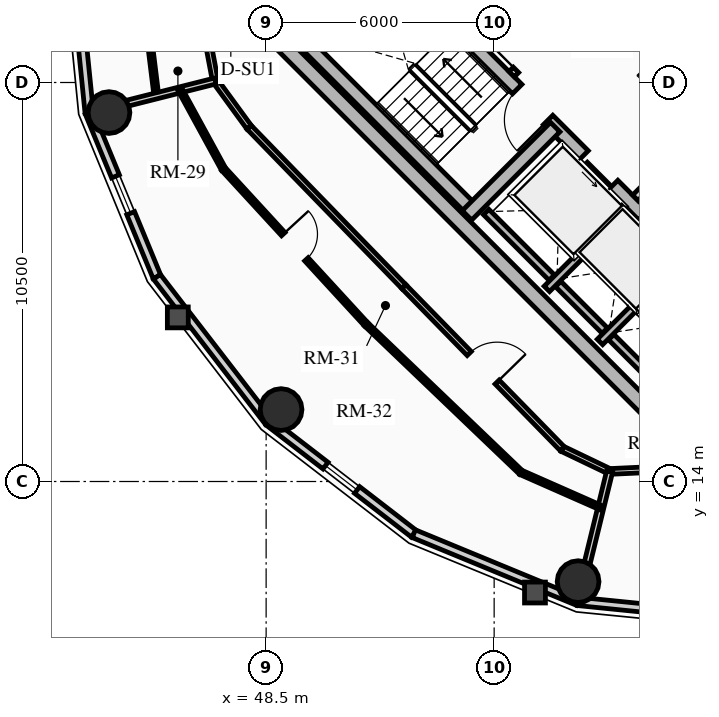
"""IFC4 building model, lengths in metres.
Left out: names, types, materials, properties, quantities, classifications, styles, units other than length and angle.
Written with IfcOpenShell. Run it as: python <this file> out.ifc"""

import sys

from ifc_helpers import new_model, si_unit, direction, frame, frame_2d, origin, origin_2d, place, context, subcontext, project, spatial, rectangle, circle, extrude, source, transform, mapped, element, fill, save


model = new_model("IFC4")
c1 = context("Model", 3, precision=1e-05, world=origin(), true_north=direction((0.0, 1.0)))
c2 = subcontext(c1, "Body", "Model", "MODEL_VIEW")
j1 = project(units=[si_unit("LENGTHUNIT", "METRE"), si_unit("PLANEANGLEUNIT", "RADIAN")], contexts=[c1])
p1 = place(None, origin())
s1 = spatial("IfcSite", under=j1, at=p1, CompositionType="ELEMENT")
p2 = place(p1, origin())
s2 = spatial("IfcBuilding", under=s1, at=p2, CompositionType="ELEMENT")
p3 = place(p2, frame((0.0, 0.0, 217.03)))
s3 = spatial("IfcBuildingStorey", under=s2, at=p3, CompositionType="ELEMENT", Elevation=217.03)
for number, where, z_axis, x_axis in (
    (1, (58.702, 15.732, 0.0), (0.0, 0.0, 1.0), (-0.707, 0.707, 0.0)),
    (2, (66.268, 23.298, 0.0), (0.0, 0.0, 1.0), (-0.707, 0.707, 0.0)),
):
    element("IfcWall", number, at=place(p3, frame(where, z_axis=z_axis, x_axis=x_axis)), inside=s3, PredefinedType="SHEAR", context=c2, shape_type="SweptSolid", body=[
        extrude(rectangle(XDim=14.1, YDim=0.4, at=frame_2d((7.05, 0.0))), origin(), (0.0, 0.0, 1.0), 2.91),
    ])
p4 = place(p3, frame((61.06, 18.373, 0.0), z_axis=(0.0, 0.0, 1.0), x_axis=(-0.707106781187, 0.707106781187, 0.0)))
e3 = element("IfcWall", 3, at=p4, inside=s3, PredefinedType="SHEAR", context=c2, shape_type="SweptSolid", body=[
    extrude(rectangle(XDim=13.7, YDim=0.35, at=frame_2d((6.85, 0.0))), origin(), (0.0, 0.0, 1.0), 2.91),
])
m1 = source(origin(), c2, "Body", "SweptSolid", [
    extrude(rectangle(XDim=1.1, YDim=2.015, at=frame_2d((0.55, 1.007))), frame((0.0, 0.185, 0.0), z_axis=(0.0, -1.0, 0.0), x_axis=(1.0, 0.0, 0.0)), (0.0, 0.0, 1.0), 0.37),
])
p5 = place(p4, frame((4.85, 0.0, 0.0)))
e4 = element("IfcOpeningElement", 4, at=p5, cuts=e3, PredefinedType="OPENING", context=c2, shape_type="MappedRepresentation", body=[
    mapped(m1, transform((0.0, 0.0, 0.0), x_axis=(1.0, 0.0, 0.0), y_axis=(0.0, 1.0, 0.0), z_axis=(0.0, 0.0, 1.0), scale=1.0)),
])
p6 = place(p4, frame((0.625, 0.0, 0.0)))
e5 = element("IfcOpeningElement", 5, at=p6, cuts=e3, PredefinedType="OPENING", context=c2, shape_type="MappedRepresentation", body=[
    mapped(m1, transform((0.0, 0.0, 0.0), x_axis=(1.0, 0.0, 0.0), y_axis=(0.0, 1.0, 0.0), z_axis=(0.0, 0.0, 1.0), scale=1.0)),
])
p7 = place(p4, frame((2.625, 0.0, 0.0)))
e6 = element("IfcOpeningElement", 6, at=p7, cuts=e3, PredefinedType="OPENING", context=c2, shape_type="MappedRepresentation", body=[
    mapped(m1, transform((0.0, 0.0, 0.0), x_axis=(1.0, 0.0, 0.0), y_axis=(0.0, 1.0, 0.0), z_axis=(0.0, 0.0, 1.0), scale=1.0)),
])
m2 = source(origin(), c2, "Body", "SweptSolid", [
    extrude(rectangle(XDim=1.15, YDim=2.02, at=frame_2d((0.575, 1.01))), frame((0.0, 0.185, 0.0), z_axis=(0.0, -1.0, 0.0), x_axis=(1.0, 0.0, 0.0)), (0.0, 0.0, 1.0), 0.37),
])
p8 = place(p4, frame((7.27, 0.0, 0.0)))
e7 = element("IfcOpeningElement", 7, at=p8, cuts=e3, PredefinedType="OPENING", context=c2, shape_type="MappedRepresentation", body=[
    mapped(m2, transform((0.0, 0.0, 0.0), x_axis=(1.0, 0.0, 0.0), y_axis=(0.0, 1.0, 0.0), z_axis=(0.0, 0.0, 1.0), scale=1.0)),
])
p9 = place(p3, frame((63.627, 20.94, 0.0), z_axis=(0.0, 0.0, 1.0), x_axis=(-0.707119496762, 0.707094065383, 0.0)))
e8 = element("IfcWall", 8, at=p9, inside=s3, PredefinedType="SHEAR", context=c2, shape_type="SweptSolid", body=[
    extrude(rectangle(XDim=9.6, YDim=0.35, at=frame_2d((4.8, 0.0))), origin(), (0.0, 0.0, 1.0), 2.91),
])
p10 = place(p9, frame((5.28, 0.0, 0.0)))
e9 = element("IfcOpeningElement", 9, at=p10, cuts=e8, PredefinedType="OPENING", context=c2, shape_type="MappedRepresentation", body=[
    mapped(m2, transform((0.0, 0.0, 0.0), x_axis=(1.0, 0.0, 0.0), y_axis=(0.0, 1.0, 0.0), z_axis=(0.0, 0.0, 1.0), scale=1.0)),
])
p11 = place(p3, frame((53.922, 21.141, 0.0), z_axis=(0.0, 0.0, 1.0), x_axis=(-0.707106781187, 0.707106781187, 0.0)))
e10 = element("IfcWall", 10, at=p11, inside=s3, PredefinedType="SHEAR", context=c2, shape_type="SweptSolid", body=[
    extrude(rectangle(XDim=6.695, YDim=0.35, at=frame_2d((3.348, 0.0))), origin(), (0.0, 0.0, 1.0), 2.91),
])
p12 = place(p3, frame((53.784, 21.003, 0.0), z_axis=(0.0, 0.0, 1.0), x_axis=(0.707106781187, 0.707106781187, 0.0)))
e11 = element("IfcWall", 11, at=p12, inside=s3, PredefinedType="SHEAR", context=c2, shape_type="SweptSolid", body=[
    extrude(rectangle(XDim=3.285, YDim=0.35, at=frame_2d((1.643, 0.0))), origin(), (0.0, 0.0, 1.0), 2.91),
])
for number, where, z_axis, x_axis in (
    (12, (44.365, 23.709, 0.0), (0.0, 0.0, 1.0), (1.0, 0.0, 0.0)),
    (13, (48.893, 15.893, 0.0), (0.0, 0.0, 1.0), (1.0, 0.0, 0.0)),
    (14, (56.709, 11.365, 0.0), (0.0, 0.0, 1.0), (1.0, 0.0, 0.0)),
):
    element("IfcColumn", number, at=place(p3, frame(where, z_axis=z_axis, x_axis=x_axis)), inside=s3, PredefinedType="USERDEFINED", context=c2, shape_type="SweptSolid", body=[
        extrude(circle(Radius=0.55, at=origin_2d()), origin(), (0.0, 0.0, 1.0), 2.91),
    ])
p13 = place(p3, frame((43.845, 23.705, 0.0), z_axis=(0.0, 0.0, 1.0), x_axis=(-0.100570534541, 0.994929930991, 0.0)))
e15 = element("IfcWall", 15, at=p13, inside=s3, PredefinedType="SOLIDWALL", context=c2, shape_type="SweptSolid", body=[
    extrude(rectangle(XDim=4.418, YDim=0.22, at=frame_2d((2.209, 0.0))), origin(), (0.0, 0.0, 1.0), 2.322),
])
m3 = source(origin(), c2, "Body", "SweptSolid", [
    extrude(rectangle(XDim=1.05, YDim=1.3, at=frame_2d((0.525, 0.65))), frame((0.0, 0.12, 0.0), z_axis=(0.0, -1.0, 0.0), x_axis=(1.0, 0.0, 0.0)), (0.0, 0.0, 1.0), 0.24),
])
p14 = place(p13, frame((1.684, 0.0, 0.65)))
e16 = element("IfcOpeningElement", 16, at=p14, cuts=e15, PredefinedType="OPENING", context=c2, shape_type="MappedRepresentation", body=[
    mapped(m3, transform((0.0, 0.0, 0.0), x_axis=(1.0, 0.0, 0.0), y_axis=(0.0, 1.0, 0.0), z_axis=(0.0, 0.0, 1.0), scale=1.0)),
])
p15 = place(p3, frame((45.626, 19.387, 0.0), z_axis=(0.0, 0.0, 1.0), x_axis=(-0.381309704956, 0.924447353237, 0.0)))
e17 = element("IfcWall", 17, at=p15, inside=s3, PredefinedType="SOLIDWALL", context=c2, shape_type="SweptSolid", body=[
    extrude(rectangle(XDim=4.671, YDim=0.22, at=frame_2d((2.335, 0.0))), origin(), (0.0, 0.0, 1.0), 2.322),
])
p16 = place(p15, frame((1.81, 0.0, 0.65)))
e18 = element("IfcOpeningElement", 18, at=p16, cuts=e17, PredefinedType="OPENING", context=c2, shape_type="MappedRepresentation", body=[
    mapped(m3, transform((0.0, 0.0, 0.0), x_axis=(1.0, 0.0, 0.0), y_axis=(0.0, 1.0, 0.0), z_axis=(0.0, 0.0, 1.0), scale=1.0)),
])
p17 = place(p3, frame((48.569, 15.569, 0.0), z_axis=(0.0, 0.0, 1.0), x_axis=(-0.610523083886, 0.791998462147, 0.0)))
e19 = element("IfcWall", 19, at=p17, inside=s3, PredefinedType="SOLIDWALL", context=c2, shape_type="SweptSolid", body=[
    extrude(rectangle(XDim=4.82, YDim=0.22, at=frame_2d((2.41, 0.0))), origin(), (0.0, 0.0, 1.0), 2.322),
])
p18 = place(p3, frame((52.387, 12.626, 0.0), z_axis=(0.0, 0.0, 1.0), x_axis=(-0.791998462147, 0.610523083886, 0.0)))
e20 = element("IfcWall", 20, at=p18, inside=s3, PredefinedType="SOLIDWALL", context=c2, shape_type="SweptSolid", body=[
    extrude(rectangle(XDim=4.82, YDim=0.22, at=frame_2d((2.41, 0.0))), origin(), (0.0, 0.0, 1.0), 2.322),
])
p19 = place(p18, frame((1.885, 0.0, 0.65)))
e21 = element("IfcOpeningElement", 21, at=p19, cuts=e20, PredefinedType="OPENING", context=c2, shape_type="MappedRepresentation", body=[
    mapped(m3, transform((0.0, 0.0, 0.0), x_axis=(1.0, 0.0, 0.0), y_axis=(0.0, 1.0, 0.0), z_axis=(0.0, 0.0, 1.0), scale=1.0)),
])
p20 = place(p3, frame((56.705, 10.845, 0.0), z_axis=(0.0, 0.0, 1.0), x_axis=(-0.924447353237, 0.381309704956, 0.0)))
e22 = element("IfcWall", 22, at=p20, inside=s3, PredefinedType="SOLIDWALL", context=c2, shape_type="SweptSolid", body=[
    extrude(rectangle(XDim=4.671, YDim=0.22, at=frame_2d((2.335, 0.0))), origin(), (0.0, 0.0, 1.0), 2.322),
])
p21 = place(p3, frame((61.1, 10.401, 0.0), z_axis=(0.0, 0.0, 1.0), x_axis=(-0.994929930991, 0.100570534541, 0.0)))
e23 = element("IfcWall", 23, at=p21, inside=s3, PredefinedType="SOLIDWALL", context=c2, shape_type="SweptSolid", body=[
    extrude(rectangle(XDim=4.418, YDim=0.22, at=frame_2d((2.209, 0.0))), origin(), (0.0, 0.0, 1.0), 2.322),
])
p22 = place(p21, frame((1.684, 0.0, 0.65)))
e24 = element("IfcOpeningElement", 24, at=p22, cuts=e23, PredefinedType="OPENING", context=c2, shape_type="MappedRepresentation", body=[
    mapped(m3, transform((0.0, 0.0, 0.0), x_axis=(1.0, 0.0, 0.0), y_axis=(0.0, 1.0, 0.0), z_axis=(0.0, 0.0, 1.0), scale=1.0)),
])
p23 = place(p3, frame((55.888, 19.069, 0.0), z_axis=(0.0, 0.0, 1.0), x_axis=(0.707106781187, 0.707106781187, 0.0)))
e25 = element("IfcWall", 25, at=p23, inside=s3, PredefinedType="SHEAR", context=c2, shape_type="SweptSolid", body=[
    extrude(rectangle(XDim=2.97, YDim=0.2, at=frame_2d((1.485, 0.0))), origin(), (0.0, 0.0, 1.0), 2.91),
])
p24 = place(p3, frame((56.015, 19.366, 0.0), z_axis=(0.0, 0.0, 1.0), x_axis=(-0.707106781187, 0.707106781187, 0.0)))
e26 = element("IfcWall", 26, at=p24, inside=s3, PredefinedType="SHEAR", context=c2, shape_type="SweptSolid", body=[
    extrude(rectangle(XDim=2.44, YDim=0.2, at=frame_2d((1.22, 0.0))), origin(), (0.0, 0.0, 1.0), 2.91),
])
p25 = place(p3, frame((57.284, 17.673, 0.0), z_axis=(0.0, 0.0, 1.0), x_axis=(0.707147878904, 0.70706568108, 0.0)))
e27 = element("IfcWall", 27, at=p25, inside=s3, PredefinedType="SHEAR", context=c2, shape_type="SweptSolid", body=[
    extrude(rectangle(XDim=2.97, YDim=0.2, at=frame_2d((1.485, 0.0))), origin(), (0.0, 0.0, 1.0), 2.91),
])
p26 = place(p3, frame((57.412, 17.97, 0.0), z_axis=(0.0, 0.0, 1.0), x_axis=(-0.707106781187, 0.707106781187, 0.0)))
e28 = element("IfcWall", 28, at=p26, inside=s3, PredefinedType="SHEAR", context=c2, shape_type="SweptSolid", body=[
    extrude(rectangle(XDim=1.735, YDim=0.2, at=frame_2d((0.867, 0.0))), origin(), (0.0, 0.0, 1.0), 2.91),
])
p27 = place(p3, frame((58.737, 16.644, 0.0), z_axis=(0.0, 0.0, 1.0), x_axis=(-0.707032117043, 0.707181437447, 0.0)))
e29 = element("IfcWall", 29, at=p27, inside=s3, PredefinedType="SHEAR", context=c2, shape_type="SweptSolid", body=[
    extrude(rectangle(XDim=1.635, YDim=0.2, at=frame_2d((0.817, 0.0))), origin(), (0.0, 0.0, 1.0), 2.91),
])
p28 = place(p3, frame((58.214, 21.467, 0.0), z_axis=(0.0, 0.0, 1.0), x_axis=(0.707106781187, 0.707106781187, 0.0)))
e30 = element("IfcWall", 30, at=p28, inside=s3, PredefinedType="PARTITIONING", context=c2, shape_type="SweptSolid", body=[
    extrude(rectangle(XDim=3.28, YDim=0.2, at=frame_2d((1.64, 0.0))), origin(), (0.0, 0.0, 1.0), 2.685),
])
m4 = source(origin(), c2, "Body", "SweptSolid", [
    extrude(rectangle(XDim=1.5, YDim=2.02, at=frame_2d((0.75, 1.01))), frame((0.0, 0.11, 0.0), z_axis=(0.0, -1.0, 0.0), x_axis=(1.0, 0.0, 0.0)), (0.0, 0.0, 1.0), 0.22),
])
p29 = place(p28, frame((1.55, 0.0, 0.0)))
e31 = element("IfcOpeningElement", 31, at=p29, cuts=e30, PredefinedType="OPENING", context=c2, shape_type="MappedRepresentation", body=[
    mapped(m4, transform((0.0, 0.0, 0.0), x_axis=(1.0, 0.0, 0.0), y_axis=(0.0, 1.0, 0.0), z_axis=(0.0, 0.0, 1.0), scale=1.0)),
])
p30 = place(p3, frame((54.961, 24.719, 0.0), z_axis=(0.0, 0.0, 1.0), x_axis=(0.707106781187, 0.707106781187, 0.0)))
e32 = element("IfcWall", 32, at=p30, inside=s3, PredefinedType="PARTITIONING", context=c2, shape_type="SweptSolid", body=[
    extrude(rectangle(XDim=3.28, YDim=0.2, at=frame_2d((1.64, 0.0))), origin(), (0.0, 0.0, 1.0), 2.685),
])
m5 = source(origin(), c2, "Body", "SweptSolid", [
    extrude(rectangle(XDim=0.9, YDim=2.005, at=frame_2d((0.45, 1.002))), frame((0.0, 0.11, 0.0), z_axis=(0.0, -1.0, 0.0), x_axis=(1.0, 0.0, 0.0)), (0.0, 0.0, 1.0), 0.22),
])
p31 = place(p30, frame((0.16, 0.0, 0.0)))
e33 = element("IfcOpeningElement", 33, at=p31, cuts=e32, PredefinedType="OPENING", context=c2, shape_type="MappedRepresentation", body=[
    mapped(m5, transform((0.0, 0.0, 0.0), x_axis=(1.0, 0.0, 0.0), y_axis=(0.0, 1.0, 0.0), z_axis=(0.0, 0.0, 1.0), scale=1.0)),
])
p32 = place(p3, frame((46.912, 25.862, 0.0), z_axis=(0.0, 0.0, 1.0), x_axis=(0.186095172215, -0.98253172309, 0.0)))
e34 = element("IfcWall", 34, at=p32, inside=s3, PredefinedType="PARTITIONING", context=c2, shape_type="SweptSolid", body=[
    extrude(rectangle(XDim=1.346, YDim=0.15, at=frame_2d((0.673, 0.0))), origin(), (0.0, 0.0, 1.0), 2.322),
])
p33 = place(p3, frame((47.163, 24.54, 0.0), z_axis=(0.0, 0.0, 1.0), x_axis=(0.589711902124, -0.807613690135, 0.0)))
e35 = element("IfcWall", 35, at=p33, inside=s3, PredefinedType="PARTITIONING", context=c2, shape_type="SweptSolid", body=[
    extrude(rectangle(XDim=1.507, YDim=0.15, at=frame_2d((0.753, 0.0))), origin(), (0.0, 0.0, 1.0), 2.255),
])
p34 = place(p3, frame((48.052, 23.323, 0.0), z_axis=(0.0, 0.0, 1.0), x_axis=(0.696573981306, -0.717484974454, 0.0)))
e36 = element("IfcWall", 36, at=p34, inside=s3, PredefinedType="PARTITIONING", context=c2, shape_type="SweptSolid", body=[
    extrude(rectangle(XDim=5.849, YDim=0.15, at=frame_2d((2.925, 0.0))), origin(), (0.0, 0.0, 1.0), 2.685),
])
p35 = place(p3, frame((52.126, 19.126, 0.0), z_axis=(0.0, 0.0, 1.0), x_axis=(0.698979087027, -0.715142108884, 0.0)))
e37 = element("IfcWall", 37, at=p35, inside=s3, PredefinedType="PARTITIONING", context=c2, shape_type="SweptSolid", body=[
    extrude(rectangle(XDim=5.966, YDim=0.15, at=frame_2d((2.983, 0.0))), origin(), (0.0, 0.0, 1.0), 2.322),
])
m6 = source(origin(), c2, "Body", "SweptSolid", [
    extrude(rectangle(XDim=1.05, YDim=2.015, at=frame_2d((0.525, 1.007))), frame((0.0, 0.085, 0.0), z_axis=(0.0, -1.0, 0.0), x_axis=(1.0, 0.0, 0.0)), (0.0, 0.0, 1.0), 0.17),
])
p36 = place(p35, frame((2.458, 0.0, 0.0)))
e38 = element("IfcOpeningElement", 38, at=p36, cuts=e37, PredefinedType="OPENING", context=c2, shape_type="MappedRepresentation", body=[
    mapped(m6, transform((0.0, 0.0, 0.0), x_axis=(1.0, 0.0, 0.0), y_axis=(0.0, 1.0, 0.0), z_axis=(0.0, 0.0, 1.0), scale=1.0)),
])
p37 = place(p3, frame((56.296, 14.859, 0.0), z_axis=(0.0, 0.0, 1.0), x_axis=(0.90178292445, -0.432189260823, 0.0)))
e39 = element("IfcWall", 39, at=p37, inside=s3, PredefinedType="PARTITIONING", context=c2, shape_type="SweptSolid", body=[
    extrude(rectangle(XDim=1.377, YDim=0.15, at=frame_2d((0.688, 0.0))), origin(), (0.0, 0.0, 1.0), 2.255),
])
p38 = place(p3, frame((57.538, 14.264, 0.0), z_axis=(0.0, 0.0, 1.0), x_axis=(0.99892990172, 0.046249880546, 0.0)))
e40 = element("IfcWall", 40, at=p38, inside=s3, PredefinedType="PARTITIONING", context=c2, shape_type="SweptSolid", body=[
    extrude(rectangle(XDim=1.446, YDim=0.15, at=frame_2d((0.723, 0.0))), origin(), (0.0, 0.0, 1.0), 2.322),
])
p39 = place(p3, frame((47.163, 24.54, 0.0), z_axis=(0.0, 0.0, 1.0), x_axis=(-0.9696166611, -0.244629373781, 0.0)))
e41 = element("IfcWall", 41, at=p39, inside=s3, PredefinedType="PARTITIONING", context=c2, shape_type="SweptSolid", body=[
    extrude(rectangle(XDim=3.401, YDim=0.16, at=frame_2d((1.701, 0.0))), origin(), (0.0, 0.0, 1.0), 2.322),
])
p40 = place(p3, frame((57.538, 14.264, 0.0), z_axis=(0.0, 0.0, 1.0), x_axis=(-0.237377006249, -0.971417601706, 0.0)))
e42 = element("IfcWall", 42, at=p40, inside=s3, PredefinedType="PARTITIONING", context=c2, shape_type="SweptSolid", body=[
    extrude(rectangle(XDim=3.499, YDim=0.16, at=frame_2d((1.75, 0.0))), origin(), (0.0, 0.0, 1.0), 2.322),
])
p41 = place(p3, frame((45.328, 26.457, 0.0), z_axis=(0.0, 0.0, 1.0), x_axis=(0.122605181354, -0.992455525203, 0.0)))
e43 = element("IfcWall", 43, at=p41, inside=s3, PredefinedType="PARTITIONING", context=c2, shape_type="SweptSolid", body=[
    extrude(rectangle(XDim=2.228, YDim=0.125, at=frame_2d((1.114, 0.0))), origin(), (0.0, 0.0, 1.0), 2.322),
])
m7 = source(origin(), c2, "Body", "SweptSolid", [
    extrude(rectangle(XDim=0.9, YDim=2.005, at=frame_2d((0.45, 1.002))), frame((0.0, 0.073, 0.0), z_axis=(0.0, -1.0, 0.0), x_axis=(1.0, 0.0, 0.0)), (0.0, 0.0, 1.0), 0.145),
])
p42 = place(p41, frame((0.12, 0.0, 0.0)))
e44 = element("IfcOpeningElement", 44, at=p42, cuts=e43, PredefinedType="OPENING", context=c2, shape_type="MappedRepresentation", body=[
    mapped(m7, transform((0.0, 0.0, 0.0), x_axis=(1.0, 0.0, 0.0), y_axis=(0.0, 1.0, 0.0), z_axis=(0.0, 0.0, 1.0), scale=1.0)),
])
p43 = place(p3, frame((46.24, 24.307, 0.0), z_axis=(0.0, 0.0, 1.0), x_axis=(0.479212341296, -0.87769899849, 0.0)))
e45 = element("IfcWall", 45, at=p43, inside=s3, PredefinedType="PARTITIONING", context=c2, shape_type="SweptSolid", body=[
    extrude(rectangle(XDim=2.374, YDim=0.125, at=frame_2d((1.187, 0.0))), origin(), (0.0, 0.0, 1.0), 2.255),
])
p44 = place(p3, frame((47.377, 22.223, 0.0), z_axis=(0.0, 0.0, 1.0), x_axis=(0.676554417653, -0.736392639802, 0.0)))
e46 = element("IfcWall", 46, at=p44, inside=s3, PredefinedType="PARTITIONING", context=c2, shape_type="SweptSolid", body=[
    extrude(rectangle(XDim=5.553, YDim=0.125, at=frame_2d((2.776, 0.0))), origin(), (0.0, 0.0, 1.0), 2.685),
])
p45 = place(p44, frame((2.326, 0.0, 0.0)))
e47 = element("IfcOpeningElement", 47, at=p45, cuts=e46, PredefinedType="OPENING", context=c2, shape_type="MappedRepresentation", body=[
    mapped(m7, transform((0.0, 0.0, 0.0), x_axis=(1.0, 0.0, 0.0), y_axis=(0.0, 1.0, 0.0), z_axis=(0.0, 0.0, 1.0), scale=1.0)),
])
p46 = place(p3, frame((51.134, 18.134, 0.0), z_axis=(0.0, 0.0, 1.0), x_axis=(0.722450775654, -0.691422357721, 0.0)))
e48 = element("IfcWall", 48, at=p46, inside=s3, PredefinedType="PARTITIONING", context=c2, shape_type="SweptSolid", body=[
    extrude(rectangle(XDim=5.634, YDim=0.125, at=frame_2d((2.817, 0.0))), origin(), (0.0, 0.0, 1.0), 2.322),
])
p47 = place(p3, frame((55.204, 14.239, 0.0), z_axis=(0.0, 0.0, 1.0), x_axis=(0.914999746908, -0.403454412738, 0.0)))
e49 = element("IfcWall", 49, at=p47, inside=s3, PredefinedType="PARTITIONING", context=c2, shape_type="SweptSolid", body=[
    extrude(rectangle(XDim=2.297, YDim=0.125, at=frame_2d((1.148, 0.0))), origin(), (0.0, 0.0, 1.0), 2.255),
])
m8 = source(origin(), c2, "Body", "SweptSolid", [
    extrude(rectangle(XDim=1.05, YDim=1.3, at=frame_2d((0.525, 0.65))), frame((0.0, 0.03, 0.0), z_axis=(0.0, -1.0, 0.0), x_axis=(1.0, 0.0, 0.0)), (0.0, 0.0, 1.0), 0.06),
])
p48 = place(p16, origin())
e50 = element("IfcWindow", 50, at=p48, inside=s3, PartitioningType="SINGLE_PANEL", PredefinedType="WINDOW", context=c2, shape_type="MappedRepresentation", body=[
    mapped(m8, transform((0.0, 0.0, 0.0), x_axis=(1.0, 0.0, 0.0), y_axis=(0.0, 1.0, 0.0), z_axis=(0.0, 0.0, 1.0), scale=1.0)),
])
fill(e18, e50)
p49 = place(p19, origin())
e51 = element("IfcWindow", 51, at=p49, inside=s3, PartitioningType="SINGLE_PANEL", PredefinedType="WINDOW", context=c2, shape_type="MappedRepresentation", body=[
    mapped(m8, transform((0.0, 0.0, 0.0), x_axis=(1.0, 0.0, 0.0), y_axis=(0.0, 1.0, 0.0), z_axis=(0.0, 0.0, 1.0), scale=1.0)),
])
fill(e21, e51)
m9 = source(origin(), c2, "Body", "SweptSolid", [
    extrude(rectangle(XDim=1.1, YDim=2.015, at=frame_2d((0.55, 1.007))), frame((0.0, 0.025, 0.0), z_axis=(0.0, -1.0, 0.0), x_axis=(1.0, 0.0, 0.0)), (0.0, 0.0, 1.0), 0.05),
])
p50 = place(p5, origin())
e52 = element("IfcDoor", 52, at=p50, inside=s3, OperationType="SLIDING_TO_LEFT", PredefinedType="DOOR", context=c2, shape_type="MappedRepresentation", body=[
    mapped(m9, transform((0.0, 0.0, 0.0), x_axis=(1.0, 0.0, 0.0), y_axis=(0.0, 1.0, 0.0), z_axis=(0.0, 0.0, 1.0), scale=1.0)),
])
fill(e4, e52)
m10 = source(origin(), c2, "Body", "SweptSolid", [
    extrude(rectangle(XDim=1.15, YDim=2.02, at=frame_2d((0.575, 1.01))), frame((0.0, 0.025, 0.0), z_axis=(0.0, -1.0, 0.0), x_axis=(1.0, 0.0, 0.0)), (0.0, 0.0, 1.0), 0.05),
])
p51 = place(p8, origin())
e53 = element("IfcDoor", 53, at=p51, inside=s3, OperationType="SINGLE_SWING_LEFT", PredefinedType="DOOR", context=c2, shape_type="MappedRepresentation", body=[
    mapped(m10, transform((0.0, 0.0, 0.0), x_axis=(1.0, 0.0, 0.0), y_axis=(0.0, 1.0, 0.0), z_axis=(0.0, 0.0, 1.0), scale=1.0)),
])
fill(e7, e53)
m11 = source(origin(), c2, "Body", "SweptSolid", [
    extrude(rectangle(XDim=0.9, YDim=2.005, at=frame_2d((0.45, 1.002))), frame((0.0, 0.025, 0.0), z_axis=(0.0, -1.0, 0.0), x_axis=(1.0, 0.0, 0.0)), (0.0, 0.0, 1.0), 0.05),
])
p52 = place(p31, origin())
e54 = element("IfcDoor", 54, at=p52, inside=s3, OperationType="SINGLE_SWING_LEFT", PredefinedType="DOOR", context=c2, shape_type="MappedRepresentation", body=[
    mapped(m11, transform((0.0, 0.0, 0.0), x_axis=(1.0, 0.0, 0.0), y_axis=(0.0, 1.0, 0.0), z_axis=(0.0, 0.0, 1.0), scale=1.0)),
])
fill(e33, e54)
m12 = source(origin(), c2, "Body", "SweptSolid", [
    extrude(rectangle(XDim=1.05, YDim=2.015, at=frame_2d((0.525, 1.007))), frame((0.0, 0.025, 0.0), z_axis=(0.0, -1.0, 0.0), x_axis=(1.0, 0.0, 0.0)), (0.0, 0.0, 1.0), 0.05),
])
p53 = place(p36, origin())
e55 = element("IfcDoor", 55, at=p53, inside=s3, OperationType="SINGLE_SWING_RIGHT", PredefinedType="DOOR", context=c2, shape_type="MappedRepresentation", body=[
    mapped(m12, transform((0.0, 0.0, 0.0), x_axis=(1.0, 0.0, 0.0), y_axis=(0.0, 1.0, 0.0), z_axis=(0.0, 0.0, 1.0), scale=1.0)),
])
fill(e38, e55)
p54 = place(p45, origin())
e56 = element("IfcDoor", 56, at=p54, inside=s3, OperationType="SINGLE_SWING_LEFT", PredefinedType="DOOR", context=c2, shape_type="MappedRepresentation", body=[
    mapped(m11, transform((0.0, 0.0, 0.0), x_axis=(1.0, 0.0, 0.0), y_axis=(0.0, 1.0, 0.0), z_axis=(0.0, 0.0, 1.0), scale=1.0)),
])
fill(e47, e56)
save(model, sys.argv[1])
